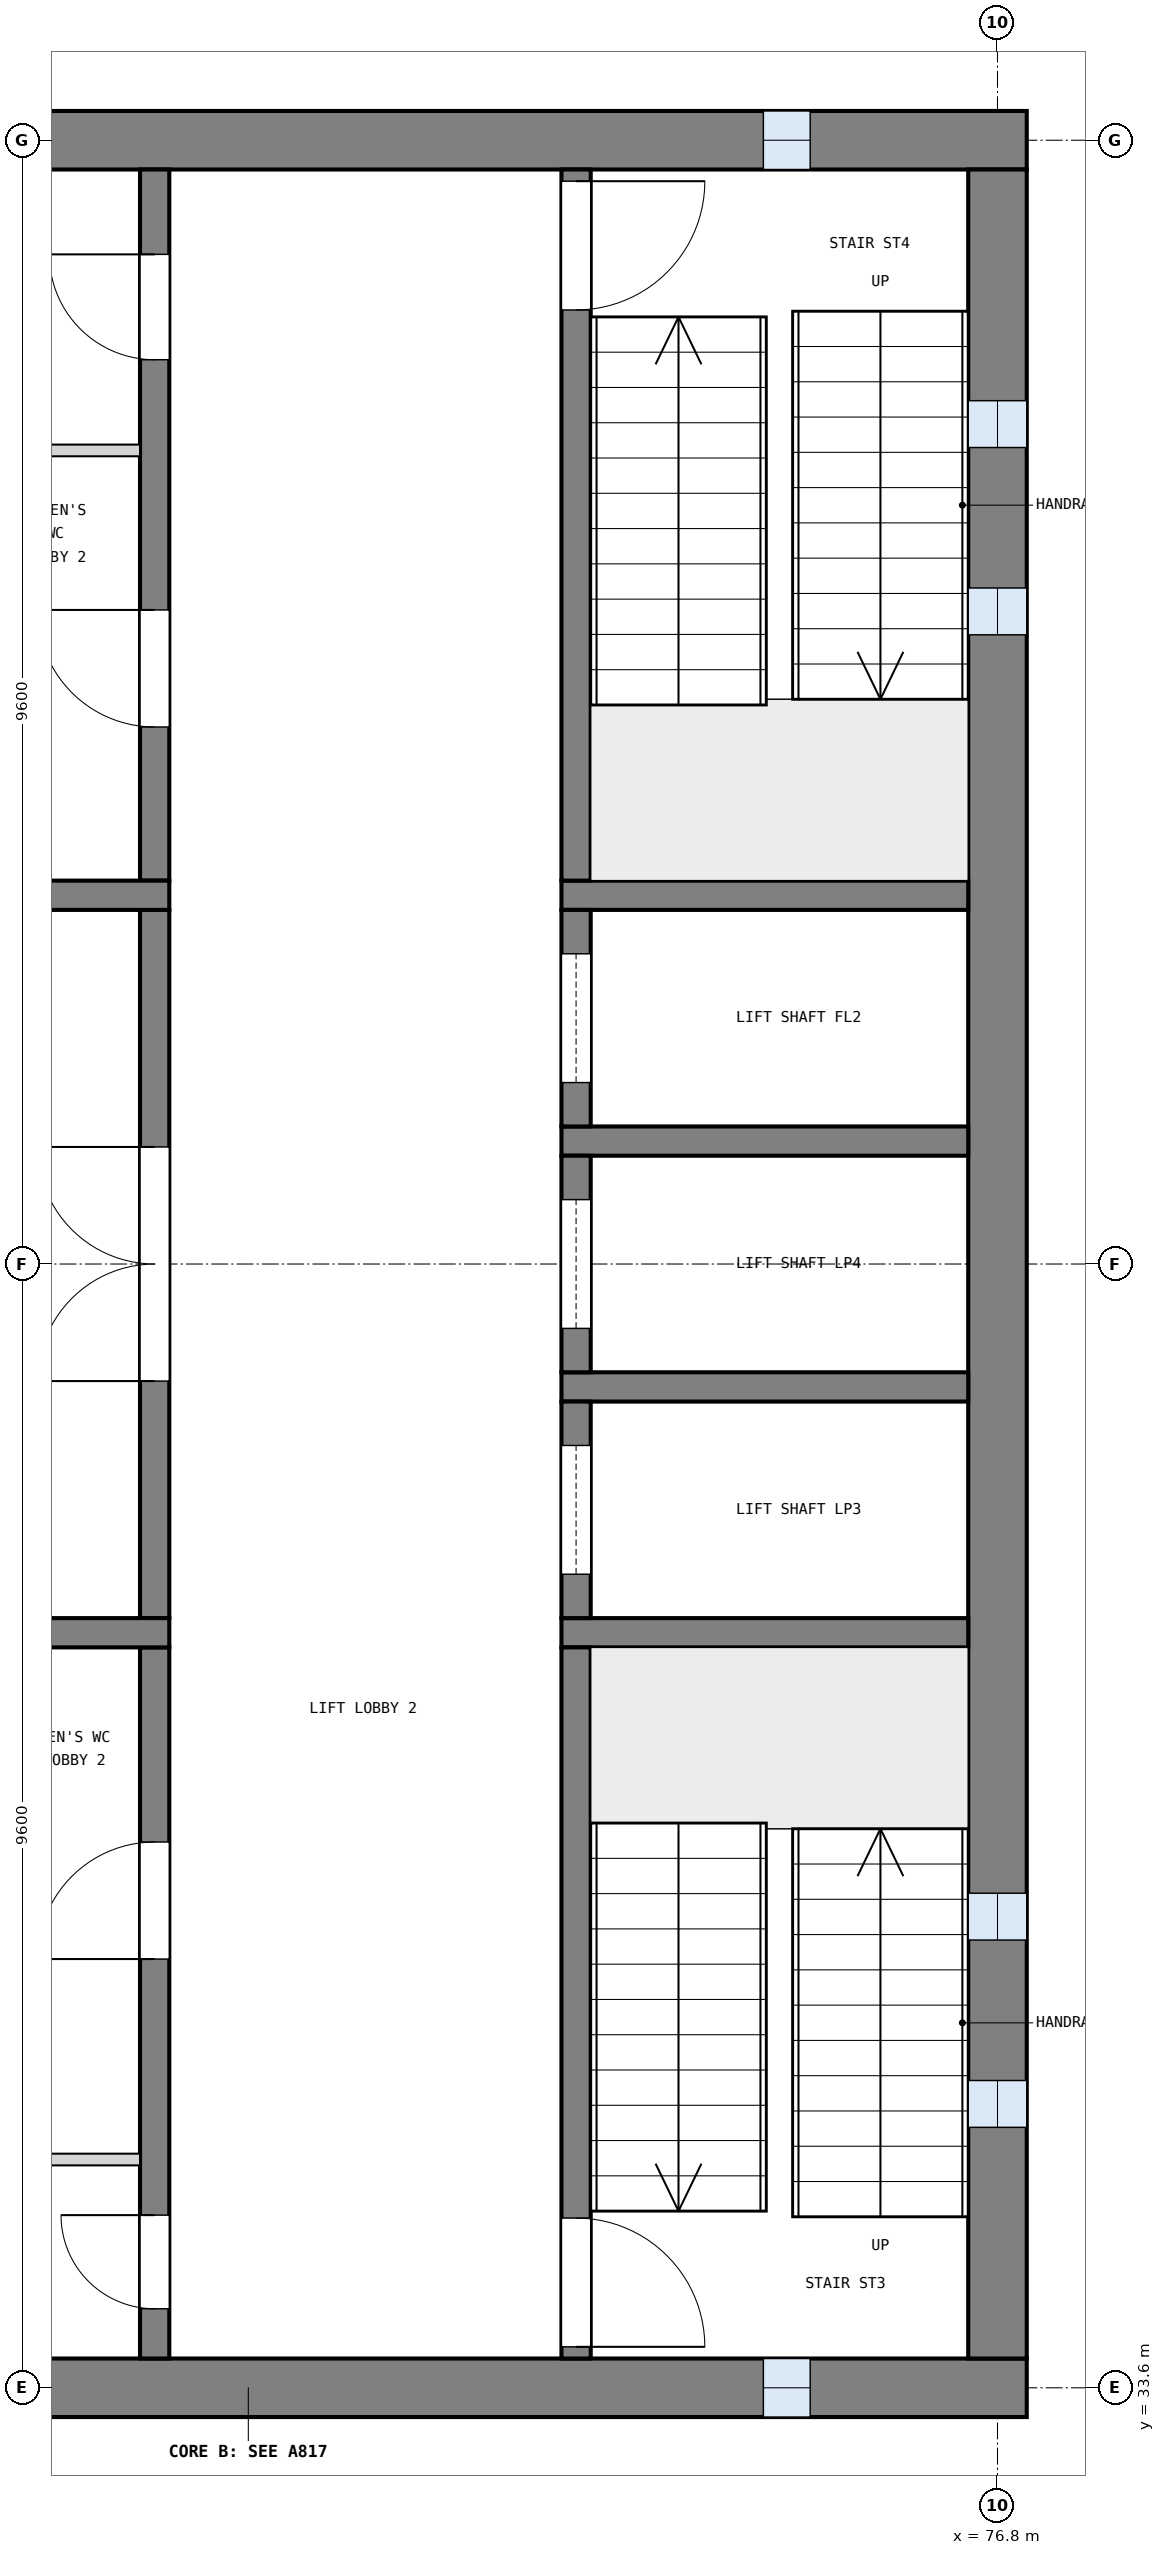
"""IFC4 building model, lengths in metres.
Left out: names, types, materials, properties, quantities, classifications, styles, units other than length and angle.
Written with IfcOpenShell. Run it as: python <this file> out.ifc"""

import sys

from ifc_helpers import new_model, si_unit, direction, frame, frame_2d, origin, place, context, subcontext, project, spatial, rectangle, extrude, element, fill, save


model = new_model("IFC4")
c1 = context("Model", 3, precision=1e-05, world=origin(), true_north=direction((0.0, 1.0)))
c2 = subcontext(c1, "Body", "Model", "MODEL_VIEW")
j1 = project(units=[si_unit("LENGTHUNIT", "METRE"), si_unit("PLANEANGLEUNIT", "RADIAN")], contexts=[c1])
p1 = place(None, origin())
s1 = spatial("IfcSite", under=j1, at=p1, CompositionType="ELEMENT")
p2 = place(p1, origin())
s2 = spatial("IfcBuilding", under=s1, at=p2, CompositionType="ELEMENT")
p3 = place(p2, frame((0.0, 0.0, 60.0)))
s3 = spatial("IfcBuildingStorey", under=s2, at=p3, CompositionType="ELEMENT", Elevation=60.0)
p4 = place(p3, frame((63.75, 52.8, 0.0), z_axis=(0.0, 0.0, 1.0), x_axis=(1.0, 0.0, 0.0)))
e1 = element("IfcWall", 1, at=p4, inside=s3, PredefinedType="SHEAR", context=c2, shape_type="SweptSolid", body=[
    extrude(rectangle(XDim=13.3, YDim=0.5, at=frame_2d((6.65, 0.0))), origin(), (0.0, 0.0, 1.0), 4.2),
])
p5 = place(p4, frame((11.05, 0.0, 1.0)))
e2 = element("IfcOpeningElement", 2, at=p5, cuts=e1, PredefinedType="OPENING", context=c2, shape_type="SweptSolid", body=[
    extrude(rectangle(XDim=0.4, YDim=2.0, at=frame_2d((0.2, 1.0))), frame((0.0, 0.26, 0.0), z_axis=(0.0, -1.0, 0.0), x_axis=(1.0, 0.0, 0.0)), (0.0, 0.0, 1.0), 0.52),
])
p6 = place(p3, frame((63.75, 33.6, 0.0), z_axis=(0.0, 0.0, 1.0), x_axis=(1.0, 0.0, 0.0)))
e3 = element("IfcWall", 3, at=p6, inside=s3, PredefinedType="SHEAR", context=c2, shape_type="SweptSolid", body=[
    extrude(rectangle(XDim=13.3, YDim=0.5, at=frame_2d((6.65, 0.0))), origin(), (0.0, 0.0, 1.0), 4.2),
])
p7 = place(p6, frame((11.05, 0.0, 1.0)))
e4 = element("IfcOpeningElement", 4, at=p7, cuts=e3, PredefinedType="OPENING", context=c2, shape_type="SweptSolid", body=[
    extrude(rectangle(XDim=0.4, YDim=2.0, at=frame_2d((0.2, 1.0))), frame((0.0, 0.26, 0.0), z_axis=(0.0, -1.0, 0.0), x_axis=(1.0, 0.0, 0.0)), (0.0, 0.0, 1.0), 0.52),
])
p8 = place(p3, frame((76.8, 33.85, 0.0), z_axis=(0.0, 0.0, 1.0), x_axis=(0.0, 1.0, 0.0)))
e5 = element("IfcWall", 5, at=p8, inside=s3, PredefinedType="SHEAR", context=c2, shape_type="SweptSolid", body=[
    extrude(rectangle(XDim=18.7, YDim=0.5, at=frame_2d((9.35, 0.0))), origin(), (0.0, 0.0, 1.0), 4.2),
])
p9 = place(p8, frame((1.975, 0.0, 1.0)))
e6 = element("IfcOpeningElement", 6, at=p9, cuts=e5, PredefinedType="OPENING", context=c2, shape_type="SweptSolid", body=[
    extrude(rectangle(XDim=0.4, YDim=2.0, at=frame_2d((0.2, 1.0))), frame((0.0, 0.26, 0.0), z_axis=(0.0, -1.0, 0.0), x_axis=(1.0, 0.0, 0.0)), (0.0, 0.0, 1.0), 0.52),
])
p10 = place(p8, frame((3.575, 0.0, 1.0)))
e7 = element("IfcOpeningElement", 7, at=p10, cuts=e5, PredefinedType="OPENING", context=c2, shape_type="SweptSolid", body=[
    extrude(rectangle(XDim=0.4, YDim=2.0, at=frame_2d((0.2, 1.0))), frame((0.0, 0.26, 0.0), z_axis=(0.0, -1.0, 0.0), x_axis=(1.0, 0.0, 0.0)), (0.0, 0.0, 1.0), 0.52),
])
p11 = place(p8, frame((14.725, 0.0, 1.0)))
e8 = element("IfcOpeningElement", 8, at=p11, cuts=e5, PredefinedType="OPENING", context=c2, shape_type="SweptSolid", body=[
    extrude(rectangle(XDim=0.4, YDim=2.0, at=frame_2d((0.2, 1.0))), frame((0.0, 0.26, 0.0), z_axis=(0.0, -1.0, 0.0), x_axis=(1.0, 0.0, 0.0)), (0.0, 0.0, 1.0), 0.52),
])
p12 = place(p8, frame((16.325, 0.0, 1.0)))
e9 = element("IfcOpeningElement", 9, at=p12, cuts=e5, PredefinedType="OPENING", context=c2, shape_type="SweptSolid", body=[
    extrude(rectangle(XDim=0.4, YDim=2.0, at=frame_2d((0.2, 1.0))), frame((0.0, 0.26, 0.0), z_axis=(0.0, -1.0, 0.0), x_axis=(1.0, 0.0, 0.0)), (0.0, 0.0, 1.0), 0.52),
])
for number, where, z_axis, x_axis in (
    (10, (76.55, 40.05, 0.0), (0.0, 0.0, 1.0), (-1.0, 0.0, 0.0)),
    (11, (76.55, 42.15, 0.0), (0.0, 0.0, 1.0), (-1.0, 0.0, 0.0)),
    (12, (76.55, 44.25, 0.0), (0.0, 0.0, 1.0), (-1.0, 0.0, 0.0)),
    (13, (76.55, 46.35, 0.0), (0.0, 0.0, 1.0), (-1.0, 0.0, 0.0)),
):
    element("IfcWall", number, at=place(p3, frame(where, z_axis=z_axis, x_axis=x_axis)), inside=s3, PredefinedType="SOLIDWALL", context=c2, shape_type="SweptSolid", body=[
        extrude(rectangle(XDim=3.475, YDim=0.25, at=frame_2d((1.738, 0.0))), origin(), (0.0, 0.0, 1.0), 3.9),
    ])
p13 = place(p3, frame((73.2, 33.85, 0.0), z_axis=(0.0, 0.0, 1.0), x_axis=(0.0, 1.0, 0.0)))
e14 = element("IfcWall", 14, at=p13, inside=s3, PredefinedType="SOLIDWALL", context=c2, shape_type="SweptSolid", body=[
    extrude(rectangle(XDim=6.075, YDim=0.25, at=frame_2d((3.038, 0.0))), origin(), (0.0, 0.0, 1.0), 3.9),
])
p14 = place(p13, frame((0.1, 0.0, 0.0)))
e15 = element("IfcOpeningElement", 15, at=p14, cuts=e14, PredefinedType="OPENING", context=c2, shape_type="SweptSolid", body=[
    extrude(rectangle(XDim=1.1, YDim=2.1, at=frame_2d((0.55, 1.05))), frame((0.0, 0.135, 0.0), z_axis=(0.0, -1.0, 0.0), x_axis=(1.0, 0.0, 0.0)), (0.0, 0.0, 1.0), 0.27),
])
p15 = place(p3, frame((73.2, 40.175, 0.0), z_axis=(0.0, 0.0, 1.0), x_axis=(0.0, 1.0, 0.0)))
e16 = element("IfcWall", 16, at=p15, inside=s3, PredefinedType="SOLIDWALL", context=c2, shape_type="SweptSolid", body=[
    extrude(rectangle(XDim=1.85, YDim=0.25, at=frame_2d((0.925, 0.0))), origin(), (0.0, 0.0, 1.0), 3.9),
])
p16 = place(p15, frame((0.375, 0.0, 0.0)))
e17 = element("IfcOpeningElement", 17, at=p16, cuts=e16, PredefinedType="OPENING", context=c2, shape_type="SweptSolid", body=[
    extrude(rectangle(XDim=1.1, YDim=2.1, at=frame_2d((0.55, 1.05))), frame((0.0, 0.135, 0.0), z_axis=(0.0, -1.0, 0.0), x_axis=(1.0, 0.0, 0.0)), (0.0, 0.0, 1.0), 0.27),
])
p17 = place(p3, frame((73.2, 42.275, 0.0), z_axis=(0.0, 0.0, 1.0), x_axis=(0.0, 1.0, 0.0)))
e18 = element("IfcWall", 18, at=p17, inside=s3, PredefinedType="SOLIDWALL", context=c2, shape_type="SweptSolid", body=[
    extrude(rectangle(XDim=1.85, YDim=0.25, at=frame_2d((0.925, 0.0))), origin(), (0.0, 0.0, 1.0), 3.9),
])
p18 = place(p17, frame((0.375, 0.0, 0.0)))
e19 = element("IfcOpeningElement", 19, at=p18, cuts=e18, PredefinedType="OPENING", context=c2, shape_type="SweptSolid", body=[
    extrude(rectangle(XDim=1.1, YDim=2.1, at=frame_2d((0.55, 1.05))), frame((0.0, 0.135, 0.0), z_axis=(0.0, -1.0, 0.0), x_axis=(1.0, 0.0, 0.0)), (0.0, 0.0, 1.0), 0.27),
])
p19 = place(p3, frame((73.2, 44.375, 0.0), z_axis=(0.0, 0.0, 1.0), x_axis=(0.0, 1.0, 0.0)))
e20 = element("IfcWall", 20, at=p19, inside=s3, PredefinedType="SOLIDWALL", context=c2, shape_type="SweptSolid", body=[
    extrude(rectangle(XDim=1.85, YDim=0.25, at=frame_2d((0.925, 0.0))), origin(), (0.0, 0.0, 1.0), 3.9),
])
p20 = place(p19, frame((0.375, 0.0, 0.0)))
e21 = element("IfcOpeningElement", 21, at=p20, cuts=e20, PredefinedType="OPENING", context=c2, shape_type="SweptSolid", body=[
    extrude(rectangle(XDim=1.1, YDim=2.1, at=frame_2d((0.55, 1.05))), frame((0.0, 0.135, 0.0), z_axis=(0.0, -1.0, 0.0), x_axis=(1.0, 0.0, 0.0)), (0.0, 0.0, 1.0), 0.27),
])
p21 = place(p3, frame((73.2, 46.475, 0.0), z_axis=(0.0, 0.0, 1.0), x_axis=(0.0, 1.0, 0.0)))
e22 = element("IfcWall", 22, at=p21, inside=s3, PredefinedType="SOLIDWALL", context=c2, shape_type="SweptSolid", body=[
    extrude(rectangle(XDim=6.075, YDim=0.25, at=frame_2d((3.038, 0.0))), origin(), (0.0, 0.0, 1.0), 3.9),
])
p22 = place(p21, frame((4.875, 0.0, 0.0)))
e23 = element("IfcOpeningElement", 23, at=p22, cuts=e22, PredefinedType="OPENING", context=c2, shape_type="SweptSolid", body=[
    extrude(rectangle(XDim=1.1, YDim=2.1, at=frame_2d((0.55, 1.05))), frame((0.0, 0.135, 0.0), z_axis=(0.0, -1.0, 0.0), x_axis=(1.0, 0.0, 0.0)), (0.0, 0.0, 1.0), 0.27),
])
p23 = place(p3, frame((69.6, 33.85, 0.0), z_axis=(0.0, 0.0, 1.0), x_axis=(0.0, 1.0, 0.0)))
e24 = element("IfcWall", 24, at=p23, inside=s3, PredefinedType="SOLIDWALL", context=c2, shape_type="SweptSolid", body=[
    extrude(rectangle(XDim=6.075, YDim=0.25, at=frame_2d((3.038, 0.0))), origin(), (0.0, 0.0, 1.0), 3.9),
])
p24 = place(p23, frame((0.425, 0.0, 0.0)))
e25 = element("IfcOpeningElement", 25, at=p24, cuts=e24, PredefinedType="OPENING", context=c2, shape_type="SweptSolid", body=[
    extrude(rectangle(XDim=0.8, YDim=2.1, at=frame_2d((0.4, 1.05))), frame((0.0, 0.135, 0.0), z_axis=(0.0, -1.0, 0.0), x_axis=(1.0, 0.0, 0.0)), (0.0, 0.0, 1.0), 0.27),
])
p25 = place(p23, frame((3.413, 0.0, 0.0)))
e26 = element("IfcOpeningElement", 26, at=p25, cuts=e24, PredefinedType="OPENING", context=c2, shape_type="SweptSolid", body=[
    extrude(rectangle(XDim=1.0, YDim=2.1, at=frame_2d((0.5, 1.05))), frame((0.0, 0.135, 0.0), z_axis=(0.0, -1.0, 0.0), x_axis=(1.0, 0.0, 0.0)), (0.0, 0.0, 1.0), 0.27),
])
p26 = place(p3, frame((69.6, 40.175, 0.0), z_axis=(0.0, 0.0, 1.0), x_axis=(0.0, 1.0, 0.0)))
e27 = element("IfcWall", 27, at=p26, inside=s3, PredefinedType="SOLIDWALL", context=c2, shape_type="SweptSolid", body=[
    extrude(rectangle(XDim=6.05, YDim=0.25, at=frame_2d((3.025, 0.0))), origin(), (0.0, 0.0, 1.0), 3.9),
])
p27 = place(p26, frame((2.025, 0.0, 0.0)))
e28 = element("IfcOpeningElement", 28, at=p27, cuts=e27, PredefinedType="OPENING", context=c2, shape_type="SweptSolid", body=[
    extrude(rectangle(XDim=2.0, YDim=2.1, at=frame_2d((1.0, 1.05))), frame((0.0, 0.135, 0.0), z_axis=(0.0, -1.0, 0.0), x_axis=(1.0, 0.0, 0.0)), (0.0, 0.0, 1.0), 0.27),
])
p28 = place(p3, frame((69.6, 46.475, 0.0), z_axis=(0.0, 0.0, 1.0), x_axis=(0.0, 1.0, 0.0)))
e29 = element("IfcWall", 29, at=p28, inside=s3, PredefinedType="SOLIDWALL", context=c2, shape_type="SweptSolid", body=[
    extrude(rectangle(XDim=6.075, YDim=0.25, at=frame_2d((3.038, 0.0))), origin(), (0.0, 0.0, 1.0), 3.9),
])
p29 = place(p28, frame((1.312, 0.0, 0.0)))
e30 = element("IfcOpeningElement", 30, at=p29, cuts=e29, PredefinedType="OPENING", context=c2, shape_type="SweptSolid", body=[
    extrude(rectangle(XDim=1.0, YDim=2.1, at=frame_2d((0.5, 1.05))), frame((0.0, 0.135, 0.0), z_axis=(0.0, -1.0, 0.0), x_axis=(1.0, 0.0, 0.0)), (0.0, 0.0, 1.0), 0.27),
])
p30 = place(p28, frame((4.45, 0.0, 0.0)))
e31 = element("IfcOpeningElement", 31, at=p30, cuts=e29, PredefinedType="OPENING", context=c2, shape_type="SweptSolid", body=[
    extrude(rectangle(XDim=0.9, YDim=2.1, at=frame_2d((0.45, 1.05))), frame((0.0, 0.135, 0.0), z_axis=(0.0, -1.0, 0.0), x_axis=(1.0, 0.0, 0.0)), (0.0, 0.0, 1.0), 0.27),
])
for number, where, z_axis, x_axis in (
    (32, (69.725, 40.05, 0.0), (0.0, 0.0, 1.0), (-1.0, 0.0, 0.0)),
    (33, (69.725, 46.35, 0.0), (0.0, 0.0, 1.0), (-1.0, 0.0, 0.0)),
):
    element("IfcWall", number, at=place(p3, frame(where, z_axis=z_axis, x_axis=x_axis)), inside=s3, PredefinedType="SOLIDWALL", context=c2, shape_type="SweptSolid", body=[
        extrude(rectangle(XDim=5.475, YDim=0.25, at=frame_2d((2.738, 0.0))), origin(), (0.0, 0.0, 1.0), 3.9),
    ])
for number, where, z_axis, x_axis in (
    (34, (69.475, 35.55, 0.0), (0.0, 0.0, 1.0), (-1.0, 0.0, 0.0)),
    (35, (69.475, 50.15, 0.0), (0.0, 0.0, 1.0), (-1.0, 0.0, 0.0)),
):
    element("IfcWall", number, at=place(p3, frame(where, z_axis=z_axis, x_axis=x_axis)), inside=s3, PredefinedType="PARTITIONING", context=c2, shape_type="SweptSolid", body=[
        extrude(rectangle(XDim=5.225, YDim=0.1, at=frame_2d((2.613, 0.0))), origin(), (0.0, 0.0, 1.0), 3.9),
    ])
p31 = place(p9, origin())
e36 = element("IfcWindow", 36, at=p31, inside=s3, PartitioningType="SINGLE_PANEL", PredefinedType="WINDOW", context=c2, shape_type="SweptSolid", body=[
    extrude(rectangle(XDim=0.4, YDim=2.0, at=frame_2d((0.2, 1.0))), frame((0.0, 0.03, 0.0), z_axis=(0.0, -1.0, 0.0), x_axis=(1.0, 0.0, 0.0)), (0.0, 0.0, 1.0), 0.06),
])
fill(e6, e36)
p32 = place(p10, origin())
e37 = element("IfcWindow", 37, at=p32, inside=s3, PartitioningType="SINGLE_PANEL", PredefinedType="WINDOW", context=c2, shape_type="SweptSolid", body=[
    extrude(rectangle(XDim=0.4, YDim=2.0, at=frame_2d((0.2, 1.0))), frame((0.0, 0.03, 0.0), z_axis=(0.0, -1.0, 0.0), x_axis=(1.0, 0.0, 0.0)), (0.0, 0.0, 1.0), 0.06),
])
fill(e7, e37)
p33 = place(p11, origin())
e38 = element("IfcWindow", 38, at=p33, inside=s3, PartitioningType="SINGLE_PANEL", PredefinedType="WINDOW", context=c2, shape_type="SweptSolid", body=[
    extrude(rectangle(XDim=0.4, YDim=2.0, at=frame_2d((0.2, 1.0))), frame((0.0, 0.03, 0.0), z_axis=(0.0, -1.0, 0.0), x_axis=(1.0, 0.0, 0.0)), (0.0, 0.0, 1.0), 0.06),
])
fill(e8, e38)
p34 = place(p12, origin())
e39 = element("IfcWindow", 39, at=p34, inside=s3, PartitioningType="SINGLE_PANEL", PredefinedType="WINDOW", context=c2, shape_type="SweptSolid", body=[
    extrude(rectangle(XDim=0.4, YDim=2.0, at=frame_2d((0.2, 1.0))), frame((0.0, 0.03, 0.0), z_axis=(0.0, -1.0, 0.0), x_axis=(1.0, 0.0, 0.0)), (0.0, 0.0, 1.0), 0.06),
])
fill(e9, e39)
p35 = place(p7, origin())
e40 = element("IfcWindow", 40, at=p35, inside=s3, PartitioningType="SINGLE_PANEL", PredefinedType="WINDOW", context=c2, shape_type="SweptSolid", body=[
    extrude(rectangle(XDim=0.4, YDim=2.0, at=frame_2d((0.2, 1.0))), frame((0.0, 0.03, 0.0), z_axis=(0.0, -1.0, 0.0), x_axis=(1.0, 0.0, 0.0)), (0.0, 0.0, 1.0), 0.06),
])
fill(e4, e40)
p36 = place(p5, origin())
e41 = element("IfcWindow", 41, at=p36, inside=s3, PartitioningType="SINGLE_PANEL", PredefinedType="WINDOW", context=c2, shape_type="SweptSolid", body=[
    extrude(rectangle(XDim=0.4, YDim=2.0, at=frame_2d((0.2, 1.0))), frame((0.0, 0.03, 0.0), z_axis=(0.0, -1.0, 0.0), x_axis=(1.0, 0.0, 0.0)), (0.0, 0.0, 1.0), 0.06),
])
fill(e2, e41)
p37 = place(p14, frame((1.1, 0.0, 0.0), z_axis=(0.0, 0.0, 1.0), x_axis=(-1.0, 0.0, 0.0)))
e42 = element("IfcDoor", 42, at=p37, inside=s3, OperationType="SINGLE_SWING_RIGHT", PredefinedType="DOOR", context=c2, shape_type="SweptSolid", body=[
    extrude(rectangle(XDim=1.1, YDim=2.1, at=frame_2d((0.55, 1.05))), frame((0.0, 0.025, 0.0), z_axis=(0.0, -1.0, 0.0), x_axis=(1.0, 0.0, 0.0)), (0.0, 0.0, 1.0), 0.05),
])
fill(e15, e42)
p38 = place(p22, frame((1.1, 0.0, 0.0), z_axis=(0.0, 0.0, 1.0), x_axis=(-1.0, 0.0, 0.0)))
e43 = element("IfcDoor", 43, at=p38, inside=s3, OperationType="SINGLE_SWING_LEFT", PredefinedType="DOOR", context=c2, shape_type="SweptSolid", body=[
    extrude(rectangle(XDim=1.1, YDim=2.1, at=frame_2d((0.55, 1.05))), frame((0.0, 0.025, 0.0), z_axis=(0.0, -1.0, 0.0), x_axis=(1.0, 0.0, 0.0)), (0.0, 0.0, 1.0), 0.05),
])
fill(e23, e43)
p39 = place(p16, origin())
e44 = element("IfcDoor", 44, at=p39, inside=s3, OperationType="SLIDING_TO_LEFT", PredefinedType="DOOR", context=c2, shape_type="SweptSolid", body=[
    extrude(rectangle(XDim=1.1, YDim=2.1, at=frame_2d((0.55, 1.05))), frame((0.0, 0.025, 0.0), z_axis=(0.0, -1.0, 0.0), x_axis=(1.0, 0.0, 0.0)), (0.0, 0.0, 1.0), 0.05),
])
fill(e17, e44)
p40 = place(p18, origin())
e45 = element("IfcDoor", 45, at=p40, inside=s3, OperationType="SLIDING_TO_LEFT", PredefinedType="DOOR", context=c2, shape_type="SweptSolid", body=[
    extrude(rectangle(XDim=1.1, YDim=2.1, at=frame_2d((0.55, 1.05))), frame((0.0, 0.025, 0.0), z_axis=(0.0, -1.0, 0.0), x_axis=(1.0, 0.0, 0.0)), (0.0, 0.0, 1.0), 0.05),
])
fill(e19, e45)
p41 = place(p20, origin())
e46 = element("IfcDoor", 46, at=p41, inside=s3, OperationType="SLIDING_TO_LEFT", PredefinedType="DOOR", context=c2, shape_type="SweptSolid", body=[
    extrude(rectangle(XDim=1.1, YDim=2.1, at=frame_2d((0.55, 1.05))), frame((0.0, 0.025, 0.0), z_axis=(0.0, -1.0, 0.0), x_axis=(1.0, 0.0, 0.0)), (0.0, 0.0, 1.0), 0.05),
])
fill(e21, e46)
p42 = place(p27, origin())
e47 = element("IfcDoor", 47, at=p42, inside=s3, OperationType="DOUBLE_DOOR_SINGLE_SWING", PredefinedType="DOOR", context=c2, shape_type="SweptSolid", body=[
    extrude(rectangle(XDim=2.0, YDim=2.1, at=frame_2d((1.0, 1.05))), frame((0.0, 0.025, 0.0), z_axis=(0.0, -1.0, 0.0), x_axis=(1.0, 0.0, 0.0)), (0.0, 0.0, 1.0), 0.05),
])
fill(e28, e47)
p43 = place(p24, origin())
e48 = element("IfcDoor", 48, at=p43, inside=s3, OperationType="SINGLE_SWING_RIGHT", PredefinedType="DOOR", context=c2, shape_type="SweptSolid", body=[
    extrude(rectangle(XDim=0.8, YDim=2.1, at=frame_2d((0.4, 1.05))), frame((0.0, 0.025, 0.0), z_axis=(0.0, -1.0, 0.0), x_axis=(1.0, 0.0, 0.0)), (0.0, 0.0, 1.0), 0.05),
])
fill(e25, e48)
p44 = place(p25, origin())
e49 = element("IfcDoor", 49, at=p44, inside=s3, OperationType="SINGLE_SWING_LEFT", PredefinedType="DOOR", context=c2, shape_type="SweptSolid", body=[
    extrude(rectangle(XDim=1.0, YDim=2.1, at=frame_2d((0.5, 1.05))), frame((0.0, 0.025, 0.0), z_axis=(0.0, -1.0, 0.0), x_axis=(1.0, 0.0, 0.0)), (0.0, 0.0, 1.0), 0.05),
])
fill(e26, e49)
p45 = place(p29, origin())
e50 = element("IfcDoor", 50, at=p45, inside=s3, OperationType="SINGLE_SWING_RIGHT", PredefinedType="DOOR", context=c2, shape_type="SweptSolid", body=[
    extrude(rectangle(XDim=1.0, YDim=2.1, at=frame_2d((0.5, 1.05))), frame((0.0, 0.025, 0.0), z_axis=(0.0, -1.0, 0.0), x_axis=(1.0, 0.0, 0.0)), (0.0, 0.0, 1.0), 0.05),
])
fill(e30, e50)
p46 = place(p30, origin())
e51 = element("IfcDoor", 51, at=p46, inside=s3, OperationType="SINGLE_SWING_RIGHT", PredefinedType="DOOR", context=c2, shape_type="SweptSolid", body=[
    extrude(rectangle(XDim=0.9, YDim=2.1, at=frame_2d((0.45, 1.05))), frame((0.0, 0.025, 0.0), z_axis=(0.0, -1.0, 0.0), x_axis=(1.0, 0.0, 0.0)), (0.0, 0.0, 1.0), 0.05),
])
fill(e31, e51)
save(model, sys.argv[1])
